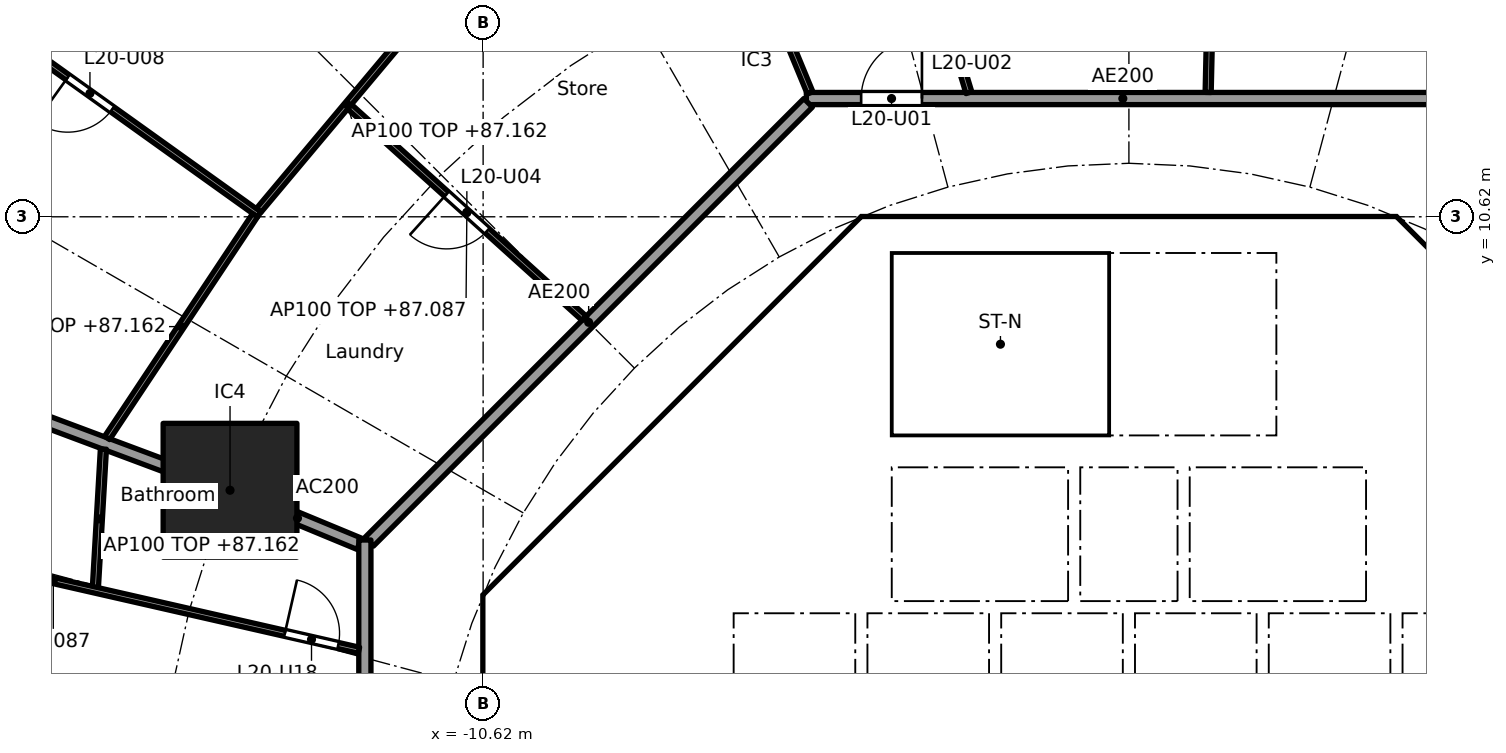
"""IFC4 building model, lengths in metres.
Left out: names, types, materials, properties, quantities, classifications, styles, units other than length and angle.
Written with IfcOpenShell. Run it as: python <this file> out.ifc"""

import sys

from ifc_helpers import new_model, si_unit, direction, frame, frame_2d, origin, origin_2d, place, context, subcontext, project, spatial, polyline, rectangle, outline, extrude, element, fill, save


model = new_model("IFC4")
c1 = context("Model", 3, precision=1e-05, world=origin(), true_north=direction((0.0, 1.0)))
c2 = subcontext(c1, "Body", "Model", "MODEL_VIEW")
j1 = project(units=[si_unit("LENGTHUNIT", "METRE"), si_unit("PLANEANGLEUNIT", "RADIAN")], contexts=[c1])
p1 = place(None, origin())
s1 = spatial("IfcSite", under=j1, at=p1, CompositionType="ELEMENT")
p2 = place(p1, origin())
s2 = spatial("IfcBuilding", under=s1, at=p2, CompositionType="ELEMENT")
p3 = place(p2, frame((0.0, 0.0, 84.4)))
s3 = spatial("IfcBuildingStorey", under=s2, at=p3, CompositionType="ELEMENT", Elevation=84.4)
p4 = place(p3, frame((-14.782, 6.123, 0.0), z_axis=(0.0, 0.0, 1.0), x_axis=(1.0, 0.0, 0.0)))
e1 = element("IfcColumn", 1, at=p4, inside=s3, PredefinedType="COLUMN", context=c2, shape_type="SweptSolid", body=[
    extrude(rectangle(XDim=2.2, YDim=2.2, at=origin_2d()), origin(), (0.0, 0.0, 1.0), 3.7),
])
p5 = place(p3, frame((9.988, 4.613, 0.0), z_axis=(0.0, 0.0, 1.0), x_axis=(-0.707106781187, 0.707106781187, 0.0)))
e2 = element("IfcWall", 2, at=p5, inside=s3, PredefinedType="SHEAR", context=c2, shape_type="SweptSolid", body=[
    extrude(rectangle(XDim=7.602, YDim=0.6, at=frame_2d((3.801, 0.0))), origin(), (0.0, 0.0, 1.0), 3.44),
])
p6 = place(p5, frame((3.201, 0.0, 0.0)))
e3 = element("IfcOpeningElement", 3, at=p6, cuts=e2, PredefinedType="OPENING", context=c2, shape_type="SweptSolid", body=[
    extrude(rectangle(XDim=1.2, YDim=2.1, at=frame_2d((0.6, 1.05))), frame((0.0, 0.31, 0.0), z_axis=(0.0, -1.0, 0.0), x_axis=(1.0, 0.0, 0.0)), (0.0, 0.0, 1.0), 0.62),
])
p7 = place(p3, frame((-4.613, 9.988, 0.0), z_axis=(0.0, 0.0, 1.0), x_axis=(-0.707106781187, -0.707106781187, 0.0)))
e4 = element("IfcWall", 4, at=p7, inside=s3, PredefinedType="SHEAR", context=c2, shape_type="SweptSolid", body=[
    extrude(rectangle(XDim=7.602, YDim=0.6, at=frame_2d((3.801, 0.0))), origin(), (0.0, 0.0, 1.0), 3.44),
])
p8 = place(p7, frame((0.351, 0.0, 0.0)))
e5 = element("IfcOpeningElement", 5, at=p8, cuts=e4, PredefinedType="OPENING", context=c2, shape_type="SweptSolid", body=[
    extrude(rectangle(XDim=1.1, YDim=2.1, at=frame_2d((0.55, 1.05))), frame((0.0, 0.31, 0.0), z_axis=(0.0, -1.0, 0.0), x_axis=(1.0, 0.0, 0.0)), (0.0, 0.0, 1.0), 0.62),
])
p9 = place(p3, frame((-10.325, 3.801, 0.0), z_axis=(0.0, 0.0, 1.0), x_axis=(0.0, -1.0, 0.0)))
e6 = element("IfcWall", 6, at=p9, inside=s3, PredefinedType="SHEAR", context=c2, shape_type="SweptSolid", body=[
    extrude(rectangle(XDim=7.602, YDim=0.6, at=frame_2d((3.801, 0.0))), origin(), (0.0, 0.0, 1.0), 3.44),
])
p10 = place(p9, frame((0.651, 0.0, 0.0)))
e7 = element("IfcOpeningElement", 7, at=p10, cuts=e6, PredefinedType="OPENING", context=c2, shape_type="SweptSolid", body=[
    extrude(rectangle(XDim=1.5, YDim=2.1, at=frame_2d((0.75, 1.05))), frame((0.0, 0.31, 0.0), z_axis=(0.0, -1.0, 0.0), x_axis=(1.0, 0.0, 0.0)), (0.0, 0.0, 1.0), 0.62),
])
p11 = place(p9, frame((5.451, 0.0, 0.0)))
e8 = element("IfcOpeningElement", 8, at=p11, cuts=e6, PredefinedType="OPENING", context=c2, shape_type="SweptSolid", body=[
    extrude(rectangle(XDim=1.5, YDim=2.1, at=frame_2d((0.75, 1.05))), frame((0.0, 0.31, 0.0), z_axis=(0.0, -1.0, 0.0), x_axis=(1.0, 0.0, 0.0)), (0.0, 0.0, 1.0), 0.62),
])
p12 = place(p3, frame((-5.8, 4.3, 0.0), z_axis=(0.0, 0.0, 1.0), x_axis=(0.0, 1.0, 0.0)))
e9 = element("IfcWall", 9, at=p12, inside=s3, PredefinedType="PARTITIONING", context=c2, shape_type="SweptSolid", body=[
    extrude(rectangle(XDim=3.927, YDim=0.15, at=frame_2d((1.963, 0.0))), origin(), (0.0, 0.0, 1.0), 3.44),
])
p13 = place(p12, frame((1.551, 0.0, 0.0)))
e10 = element("IfcOpeningElement", 10, at=p13, cuts=e9, PredefinedType="OPENING", context=c2, shape_type="SweptSolid", body=[
    extrude(rectangle(XDim=0.9, YDim=2.1, at=frame_2d((0.45, 1.05))), frame((0.0, 0.085, 0.0), z_axis=(0.0, -1.0, 0.0), x_axis=(1.0, 0.0, 0.0)), (0.0, 0.0, 1.0), 0.17),
])
p14 = place(p3, frame((4.0, 4.3, 0.0), z_axis=(0.0, 0.0, 1.0), x_axis=(0.0, 1.0, 0.0)))
e11 = element("IfcWall", 11, at=p14, inside=s3, PredefinedType="SOLIDWALL", context=c2, shape_type="SweptSolid", body=[
    extrude(rectangle(XDim=2.2, YDim=0.2, at=frame_2d((1.1, 0.0))), origin(), (0.0, 0.0, 1.0), 3.44),
])
p15 = place(p14, frame((0.55, 0.0, 0.0)))
e12 = element("IfcOpeningElement", 12, at=p15, cuts=e11, PredefinedType="OPENING", context=c2, shape_type="SweptSolid", body=[
    extrude(rectangle(XDim=1.1, YDim=2.1, at=frame_2d((0.55, 1.05))), frame((0.0, 0.11, 0.0), z_axis=(0.0, -1.0, 0.0), x_axis=(1.0, 0.0, 0.0)), (0.0, 0.0, 1.0), 0.22),
])
p16 = place(p3, frame((-4.0, 4.3, 0.0), z_axis=(0.0, 0.0, 1.0), x_axis=(0.0, 1.0, 0.0)))
e13 = element("IfcWall", 13, at=p16, inside=s3, PredefinedType="SOLIDWALL", context=c2, shape_type="SweptSolid", body=[
    extrude(rectangle(XDim=2.2, YDim=0.2, at=frame_2d((1.1, 0.0))), origin(), (0.0, 0.0, 1.0), 3.44),
])
p17 = place(p16, frame((0.55, 0.0, 0.0)))
e14 = element("IfcOpeningElement", 14, at=p17, cuts=e13, PredefinedType="OPENING", context=c2, shape_type="SweptSolid", body=[
    extrude(rectangle(XDim=1.1, YDim=2.1, at=frame_2d((0.55, 1.05))), frame((0.0, 0.11, 0.0), z_axis=(0.0, -1.0, 0.0), x_axis=(1.0, 0.0, 0.0)), (0.0, 0.0, 1.0), 0.22),
])
p18 = place(p3, frame((4.0, 7.025, 0.0), z_axis=(0.0, 0.0, 1.0), x_axis=(0.0, 1.0, 0.0)))
e15 = element("IfcWall", 15, at=p18, inside=s3, PredefinedType="SOLIDWALL", context=c2, shape_type="SweptSolid", body=[
    extrude(rectangle(XDim=3.0, YDim=0.2, at=frame_2d((1.5, 0.0))), origin(), (0.0, 0.0, 1.0), 3.44),
])
p19 = place(p18, frame((0.925, 0.0, 0.0)))
e16 = element("IfcOpeningElement", 16, at=p19, cuts=e15, PredefinedType="OPENING", context=c2, shape_type="SweptSolid", body=[
    extrude(rectangle(XDim=1.1, YDim=2.1, at=frame_2d((0.55, 1.05))), frame((0.0, 0.11, 0.0), z_axis=(0.0, -1.0, 0.0), x_axis=(1.0, 0.0, 0.0)), (0.0, 0.0, 1.0), 0.22),
])
p20 = place(p3, origin())
e17 = element("IfcWall", 17, at=p20, inside=s3, PredefinedType="SHEAR", context=c2, shape_type="SweptSolid", body=[
    extrude(outline(polyline([(-10.2, 4.825), (-9.776, 4.401), (-10.025, 4.152), (-10.025, 3.801), (-10.625, 3.801), (-10.625, 4.401), (-10.2, 4.825)])), origin(), (0.0, 0.0, 1.0), 3.44),
])
p21 = place(p3, origin())
e18 = element("IfcWall", 18, at=p21, inside=s3, PredefinedType="SHEAR", context=c2, shape_type="SweptSolid", body=[
    extrude(outline(polyline([(-4.152, 10.025), (-4.401, 9.776), (-4.825, 10.2), (-4.401, 10.625), (4.401, 10.625), (4.825, 10.2), (4.401, 9.776), (4.152, 10.025), (-4.152, 10.025)])), origin(), (0.0, 0.0, 1.0), 3.44),
])
for number, where, z_axis, x_axis in (
    (19, (-0.9, 4.3, 0.0), (0.0, 0.0, 1.0), (0.0, 1.0, 0.0)),
    (20, (0.9, 4.3, 0.0), (0.0, 0.0, 1.0), (0.0, 1.0, 0.0)),
):
    element("IfcWall", number, at=place(p3, frame(where, z_axis=z_axis, x_axis=x_axis)), inside=s3, PredefinedType="SOLIDWALL", context=c2, shape_type="SweptSolid", body=[
        extrude(rectangle(XDim=2.2, YDim=0.2, at=frame_2d((1.1, 0.0))), origin(), (0.0, 0.0, 1.0), 3.44),
    ])
p22 = place(p3, origin())
e21 = element("IfcWall", 21, at=p22, inside=s3, PredefinedType="SOLIDWALL", context=c2, shape_type="SweptSolid", body=[
    extrude(outline(polyline([(-6.5, 2.1), (-6.7, 2.1), (-6.7, 4.3), (6.7, 4.3), (6.7, 2.1), (6.5, 2.1), (6.5, 4.1), (4.5, 4.1), (4.5, 2.1), (4.3, 2.1), (4.3, 4.1), (2.3, 4.1), (2.3, 2.1), (2.1, 2.1), (2.1, 4.1), (0.1, 4.1), (0.1, 2.1), (-0.1, 2.1), (-0.1, 4.1), (-2.1, 4.1), (-2.1, 2.1), (-2.3, 2.1), (-2.3, 4.1), (-4.3, 4.1), (-4.3, 2.1), (-4.5, 2.1), (-4.5, 4.1), (-6.5, 4.1), (-6.5, 2.1)])), origin(), (0.0, 0.0, 1.0), 3.44),
])
p23 = place(p3, frame((-10.025, 4.0, 0.0), z_axis=(0.0, 0.0, 1.0), x_axis=(1.0, 0.0, 0.0)))
e22 = element("IfcWall", 22, at=p23, inside=s3, PredefinedType="PARTITIONING", context=c2, shape_type="SweptSolid", body=[
    extrude(rectangle(XDim=3.325, YDim=0.2, at=frame_2d((1.662, 0.0))), origin(), (0.0, 0.0, 1.0), 3.44),
])
p24 = place(p3, origin())
e23 = element("IfcWall", 23, at=p24, inside=s3, PredefinedType="SOLIDWALL", context=c2, shape_type="SweptSolid", body=[
    extrude(outline(polyline([(-3.9, 7.025), (-4.1, 7.025), (-4.1, 10.025), (-3.9, 10.025), (-3.9, 7.025)])), origin(), (0.0, 0.0, 1.0), 3.44),
])
p25 = place(p3, origin())
e24 = element("IfcWall", 24, at=p25, inside=s3, PredefinedType="SOLIDWALL", context=c2, shape_type="SweptSolid", body=[
    extrude(outline(polyline([(4.1, 6.5), (-4.1, 6.5), (-4.1, 7.025), (4.1, 7.025), (4.1, 6.5)])), origin(), (0.0, 0.0, 1.0), 3.44),
])
p26 = place(p3, frame((-12.657, 5.243, 0.0), z_axis=(0.0, 0.0, 1.0), x_axis=(-0.923843626288, 0.382770106157, 0.0)))
e25 = element("IfcWall", 25, at=p26, inside=s3, PredefinedType="PARTITIONING", context=c2, shape_type="SweptSolid", body=[
    extrude(rectangle(XDim=2.199, YDim=0.2, at=frame_2d((1.1, 0.0))), origin(), (0.0, 0.0, 1.0), 3.44),
])
p27 = place(p3, frame((-14.829, 6.14, 0.0), z_axis=(0.0, 0.0, 1.0), x_axis=(-0.936597324342, 0.35040755134, 0.0)))
e26 = element("IfcWall", 26, at=p27, inside=s3, PredefinedType="PARTITIONING", context=c2, shape_type="SweptSolid", body=[
    extrude(rectangle(XDim=13.606, YDim=0.2, at=frame_2d((6.803, 0.0))), origin(), (0.0, 0.0, 1.0), 2.762),
])
p28 = place(p3, frame((5.104, 12.565, 0.0), z_axis=(0.0, 0.0, 1.0), x_axis=(-1.0, 0.0, 0.0)))
e27 = element("IfcWall", 27, at=p28, inside=s3, PredefinedType="PARTITIONING", context=c2, shape_type="SweptSolid", body=[
    extrude(rectangle(XDim=10.409, YDim=0.2, at=frame_2d((5.205, 0.0))), origin(), (0.0, 0.0, 1.0), 3.44),
])
p29 = place(p28, frame((8.508, 0.0, 0.0)))
e28 = element("IfcOpeningElement", 28, at=p29, cuts=e27, PredefinedType="OPENING", context=c2, shape_type="SweptSolid", body=[
    extrude(rectangle(XDim=1.0, YDim=2.1, at=frame_2d((0.5, 1.05))), frame((0.0, 0.11, 0.0), z_axis=(0.0, -1.0, 0.0), x_axis=(1.0, 0.0, 0.0)), (0.0, 0.0, 1.0), 0.22),
])
p30 = place(p3, frame((-5.275, 12.494, 0.0), z_axis=(0.0, 0.0, 1.0), x_axis=(-0.707106781187, -0.707106781187, 0.0)))
e29 = element("IfcWall", 29, at=p30, inside=s3, PredefinedType="PARTITIONING", context=c2, shape_type="SweptSolid", body=[
    extrude(rectangle(XDim=10.209, YDim=0.2, at=frame_2d((5.104, 0.0))), origin(), (0.0, 0.0, 1.0), 3.44),
])
p31 = place(p3, frame((-12.565, 5.304, 0.0), z_axis=(0.0, 0.0, 1.0), x_axis=(0.0, -1.0, 0.0)))
e30 = element("IfcWall", 30, at=p31, inside=s3, PredefinedType="PARTITIONING", context=c2, shape_type="SweptSolid", body=[
    extrude(rectangle(XDim=10.409, YDim=0.2, at=frame_2d((5.205, 0.0))), origin(), (0.0, 0.0, 1.0), 3.44),
])
p32 = place(p31, frame((3.07, 0.0, 0.0)))
e31 = element("IfcOpeningElement", 31, at=p32, cuts=e30, PredefinedType="OPENING", context=c2, shape_type="SweptSolid", body=[
    extrude(rectangle(XDim=1.0, YDim=2.1, at=frame_2d((0.5, 1.05))), frame((0.0, 0.11, 0.0), z_axis=(0.0, -1.0, 0.0), x_axis=(1.0, 0.0, 0.0)), (0.0, 0.0, 1.0), 0.22),
])
p33 = place(p3, frame((1.303, 12.665, 0.0), z_axis=(0.0, 0.0, 1.0), x_axis=(0.022412244057, 0.999748814111, 0.0)))
e32 = element("IfcWall", 32, at=p33, inside=s3, PredefinedType="PARTITIONING", context=c2, shape_type="SweptSolid", body=[
    extrude(rectangle(XDim=13.203, YDim=0.1, at=frame_2d((6.601, 0.0))), origin(), (0.0, 0.0, 1.0), 2.687),
])
p34 = place(p33, frame((2.407, 0.0, 0.0)))
e33 = element("IfcOpeningElement", 33, at=p34, cuts=e32, PredefinedType="OPENING", context=c2, shape_type="SweptSolid", body=[
    extrude(rectangle(XDim=0.9, YDim=2.1, at=frame_2d((0.45, 1.05))), frame((0.0, 0.06, 0.0), z_axis=(0.0, -1.0, 0.0), x_axis=(1.0, 0.0, 0.0)), (0.0, 0.0, 1.0), 0.12),
])
p35 = place(p33, frame((9.009, 0.0, 0.0)))
e34 = element("IfcOpeningElement", 34, at=p35, cuts=e32, PredefinedType="OPENING", context=c2, shape_type="SweptSolid", body=[
    extrude(rectangle(XDim=0.9, YDim=2.1, at=frame_2d((0.45, 1.05))), frame((0.0, 0.06, 0.0), z_axis=(0.0, -1.0, 0.0), x_axis=(1.0, 0.0, 0.0)), (0.0, 0.0, 1.0), 0.12),
])
p36 = place(p3, frame((-2.631, 12.66, 0.0), z_axis=(0.0, 0.0, 1.0), x_axis=(-0.290161396499, 0.956977723869, 0.0)))
e35 = element("IfcWall", 35, at=p36, inside=s3, PredefinedType="PARTITIONING", context=c2, shape_type="SweptSolid", body=[
    extrude(rectangle(XDim=13.552, YDim=0.1, at=frame_2d((6.776, 0.0))), origin(), (0.0, 0.0, 1.0), 2.687),
])
p37 = place(p36, frame((0.772, 0.0, 0.0)))
e36 = element("IfcOpeningElement", 36, at=p37, cuts=e35, PredefinedType="OPENING", context=c2, shape_type="SweptSolid", body=[
    extrude(rectangle(XDim=0.9, YDim=2.1, at=frame_2d((0.45, 1.05))), frame((0.0, 0.06, 0.0), z_axis=(0.0, -1.0, 0.0), x_axis=(1.0, 0.0, 0.0)), (0.0, 0.0, 1.0), 0.12),
])
p38 = place(p36, frame((9.212, 0.0, 0.0)))
e37 = element("IfcOpeningElement", 37, at=p38, cuts=e35, PredefinedType="OPENING", context=c2, shape_type="SweptSolid", body=[
    extrude(rectangle(XDim=0.9, YDim=2.1, at=frame_2d((0.45, 1.05))), frame((0.0, 0.06, 0.0), z_axis=(0.0, -1.0, 0.0), x_axis=(1.0, 0.0, 0.0)), (0.0, 0.0, 1.0), 0.12),
])
p39 = place(p3, frame((-5.243, 12.657, 0.0), z_axis=(0.0, 0.0, 1.0), x_axis=(-0.382703272338, 0.923871314276, 0.0)))
e38 = element("IfcWall", 38, at=p39, inside=s3, PredefinedType="PARTITIONING", context=c2, shape_type="SweptSolid", body=[
    extrude(rectangle(XDim=2.249, YDim=0.1, at=frame_2d((1.125, 0.0))), origin(), (0.0, 0.0, 1.0), 3.44),
])
p40 = place(p3, frame((-11.396, 14.202, 0.0), z_axis=(0.0, 0.0, 1.0), x_axis=(-0.642483859922, -0.766299216847, 0.0)))
e39 = element("IfcWall", 39, at=p40, inside=s3, PredefinedType="PARTITIONING", context=c2, shape_type="SweptSolid", body=[
    extrude(rectangle(XDim=4.537, YDim=0.1, at=frame_2d((2.269, 0.0))), origin(), (0.0, 0.0, 1.0), 2.762),
])
p41 = place(p3, frame((-8.959, 8.952, 0.0), z_axis=(0.0, 0.0, 1.0), x_axis=(-0.742686144764, 0.669639672045, 0.0)))
e40 = element("IfcWall", 40, at=p41, inside=s3, PredefinedType="PARTITIONING", context=c2, shape_type="SweptSolid", body=[
    extrude(rectangle(XDim=5.194, YDim=0.1, at=frame_2d((2.597, 0.0))), origin(), (0.0, 0.0, 1.0), 2.687),
])
p42 = place(p41, frame((2.147, 0.0, 0.0)))
e41 = element("IfcOpeningElement", 41, at=p42, cuts=e40, PredefinedType="OPENING", context=c2, shape_type="SweptSolid", body=[
    extrude(rectangle(XDim=0.9, YDim=2.1, at=frame_2d((0.45, 1.05))), frame((0.0, 0.06, 0.0), z_axis=(0.0, -1.0, 0.0), x_axis=(1.0, 0.0, 0.0)), (0.0, 0.0, 1.0), 0.12),
])
p43 = place(p3, frame((-14.302, 10.657, 0.0), z_axis=(0.0, 0.0, 1.0), x_axis=(-0.813183002698, 0.582008079087, 0.0)))
e42 = element("IfcWall", 42, at=p43, inside=s3, PredefinedType="PARTITIONING", context=c2, shape_type="SweptSolid", body=[
    extrude(rectangle(XDim=13.074, YDim=0.1, at=frame_2d((6.537, 0.0))), origin(), (0.0, 0.0, 1.0), 2.762),
])
p44 = place(p43, frame((2.973, 0.0, 0.0)))
e43 = element("IfcOpeningElement", 43, at=p44, cuts=e42, PredefinedType="OPENING", context=c2, shape_type="SweptSolid", body=[
    extrude(rectangle(XDim=0.9, YDim=2.1, at=frame_2d((0.45, 1.05))), frame((0.0, 0.06, 0.0), z_axis=(0.0, -1.0, 0.0), x_axis=(1.0, 0.0, 0.0)), (0.0, 0.0, 1.0), 0.12),
])
p45 = place(p43, frame((9.485, 0.0, 0.0)))
e44 = element("IfcOpeningElement", 44, at=p45, cuts=e42, PredefinedType="OPENING", context=c2, shape_type="SweptSolid", body=[
    extrude(rectangle(XDim=0.9, YDim=2.1, at=frame_2d((0.45, 1.05))), frame((0.0, 0.06, 0.0), z_axis=(0.0, -1.0, 0.0), x_axis=(1.0, 0.0, 0.0)), (0.0, 0.0, 1.0), 0.12),
])
p46 = place(p3, frame((-14.371, 10.645, 0.0), z_axis=(0.0, 0.0, 1.0), x_axis=(-0.553341009285, -0.832954817168, 0.0)))
e45 = element("IfcWall", 45, at=p46, inside=s3, PredefinedType="PARTITIONING", context=c2, shape_type="SweptSolid", body=[
    extrude(rectangle(XDim=4.396, YDim=0.1, at=frame_2d((2.198, 0.0))), origin(), (0.0, 0.0, 1.0), 2.762),
])
p47 = place(p3, frame((-16.865, 6.8, 0.0), z_axis=(0.0, 0.0, 1.0), x_axis=(-0.057751176984, -0.998331008011, 0.0)))
e46 = element("IfcWall", 46, at=p47, inside=s3, PredefinedType="PARTITIONING", context=c2, shape_type="SweptSolid", body=[
    extrude(rectangle(XDim=2.3, YDim=0.1, at=frame_2d((1.15, 0.0))), origin(), (0.0, 0.0, 1.0), 2.762),
])
p48 = place(p3, frame((-12.662, 3.492, 0.0), z_axis=(0.0, 0.0, 1.0), x_axis=(-0.974981662956, 0.22228530518, 0.0)))
e47 = element("IfcWall", 47, at=p48, inside=s3, PredefinedType="PARTITIONING", context=c2, shape_type="SweptSolid", body=[
    extrude(rectangle(XDim=10.31, YDim=0.1, at=frame_2d((5.155, 0.0))), origin(), (0.0, 0.0, 1.0), 2.687),
])
p49 = place(p48, frame((0.35, 0.0, 0.0)))
e48 = element("IfcOpeningElement", 48, at=p49, cuts=e47, PredefinedType="OPENING", context=c2, shape_type="SweptSolid", body=[
    extrude(rectangle(XDim=0.9, YDim=2.1, at=frame_2d((0.45, 1.05))), frame((0.0, 0.06, 0.0), z_axis=(0.0, -1.0, 0.0), x_axis=(1.0, 0.0, 0.0)), (0.0, 0.0, 1.0), 0.12),
])
p50 = place(p48, frame((6.931, 0.0, 0.0)))
e49 = element("IfcOpeningElement", 49, at=p50, cuts=e47, PredefinedType="OPENING", context=c2, shape_type="SweptSolid", body=[
    extrude(rectangle(XDim=0.9, YDim=2.1, at=frame_2d((0.45, 1.05))), frame((0.0, 0.06, 0.0), z_axis=(0.0, -1.0, 0.0), x_axis=(1.0, 0.0, 0.0)), (0.0, 0.0, 1.0), 0.12),
])
p51 = place(p15, origin())
e50 = element("IfcDoor", 50, at=p51, inside=s3, OperationType="DOUBLE_DOOR_SLIDING", PredefinedType="DOOR", context=c2, shape_type="SweptSolid", body=[
    extrude(rectangle(XDim=1.1, YDim=2.1, at=frame_2d((0.55, 1.05))), frame((0.0, 0.025, 0.0), z_axis=(0.0, -1.0, 0.0), x_axis=(1.0, 0.0, 0.0)), (0.0, 0.0, 1.0), 0.05),
])
fill(e12, e50)
p52 = place(p17, origin())
e51 = element("IfcDoor", 51, at=p52, inside=s3, OperationType="DOUBLE_DOOR_SLIDING", PredefinedType="DOOR", context=c2, shape_type="SweptSolid", body=[
    extrude(rectangle(XDim=1.1, YDim=2.1, at=frame_2d((0.55, 1.05))), frame((0.0, 0.025, 0.0), z_axis=(0.0, -1.0, 0.0), x_axis=(1.0, 0.0, 0.0)), (0.0, 0.0, 1.0), 0.05),
])
fill(e14, e51)
p53 = place(p19, origin())
e52 = element("IfcDoor", 52, at=p53, inside=s3, OperationType="SINGLE_SWING_RIGHT", PredefinedType="DOOR", context=c2, shape_type="SweptSolid", body=[
    extrude(rectangle(XDim=1.1, YDim=2.1, at=frame_2d((0.55, 1.05))), frame((0.0, 0.025, 0.0), z_axis=(0.0, -1.0, 0.0), x_axis=(1.0, 0.0, 0.0)), (0.0, 0.0, 1.0), 0.05),
])
fill(e16, e52)
p54 = place(p13, origin())
e53 = element("IfcDoor", 53, at=p54, inside=s3, OperationType="SINGLE_SWING_LEFT", PredefinedType="DOOR", context=c2, shape_type="SweptSolid", body=[
    extrude(rectangle(XDim=0.9, YDim=2.1, at=frame_2d((0.45, 1.05))), frame((0.0, 0.025, 0.0), z_axis=(0.0, -1.0, 0.0), x_axis=(1.0, 0.0, 0.0)), (0.0, 0.0, 1.0), 0.05),
])
fill(e10, e53)
p55 = place(p10, origin())
e54 = element("IfcDoor", 54, at=p55, inside=s3, OperationType="DOUBLE_DOOR_SINGLE_SWING", PredefinedType="DOOR", context=c2, shape_type="SweptSolid", body=[
    extrude(rectangle(XDim=1.5, YDim=2.1, at=frame_2d((0.75, 1.05))), frame((0.0, 0.025, 0.0), z_axis=(0.0, -1.0, 0.0), x_axis=(1.0, 0.0, 0.0)), (0.0, 0.0, 1.0), 0.05),
])
fill(e7, e54)
p56 = place(p8, origin())
e55 = element("IfcDoor", 55, at=p56, inside=s3, OperationType="SINGLE_SWING_LEFT", PredefinedType="DOOR", context=c2, shape_type="SweptSolid", body=[
    extrude(rectangle(XDim=1.1, YDim=2.1, at=frame_2d((0.55, 1.05))), frame((0.0, 0.025, 0.0), z_axis=(0.0, -1.0, 0.0), x_axis=(1.0, 0.0, 0.0)), (0.0, 0.0, 1.0), 0.05),
])
fill(e5, e55)
p57 = place(p29, frame((1.0, 0.0, 0.0), x_axis=(-1.0, 0.0, 0.0)))
e56 = element("IfcDoor", 56, at=p57, inside=s3, OperationType="SINGLE_SWING_RIGHT", PredefinedType="DOOR", context=c2, shape_type="SweptSolid", body=[
    extrude(rectangle(XDim=1.0, YDim=2.1, at=frame_2d((0.5, 1.05))), frame((0.0, 0.025, 0.0), z_axis=(0.0, -1.0, 0.0), x_axis=(1.0, 0.0, 0.0)), (0.0, 0.0, 1.0), 0.05),
])
fill(e28, e56)
p58 = place(p42, origin())
e57 = element("IfcDoor", 57, at=p58, inside=s3, OperationType="SINGLE_SWING_RIGHT", PredefinedType="DOOR", context=c2, shape_type="SweptSolid", body=[
    extrude(rectangle(XDim=0.9, YDim=2.1, at=frame_2d((0.45, 1.05))), frame((0.0, 0.025, 0.0), z_axis=(0.0, -1.0, 0.0), x_axis=(1.0, 0.0, 0.0)), (0.0, 0.0, 1.0), 0.05),
])
fill(e41, e57)
p59 = place(p44, origin())
e58 = element("IfcDoor", 58, at=p59, inside=s3, OperationType="SINGLE_SWING_RIGHT", PredefinedType="DOOR", context=c2, shape_type="SweptSolid", body=[
    extrude(rectangle(XDim=0.9, YDim=2.1, at=frame_2d((0.45, 1.05))), frame((0.0, 0.025, 0.0), z_axis=(0.0, -1.0, 0.0), x_axis=(1.0, 0.0, 0.0)), (0.0, 0.0, 1.0), 0.05),
])
fill(e43, e58)
p60 = place(p49, frame((0.9, 0.0, 0.0), x_axis=(-1.0, 0.0, 0.0)))
e59 = element("IfcDoor", 59, at=p60, inside=s3, OperationType="SINGLE_SWING_LEFT", PredefinedType="DOOR", context=c2, shape_type="SweptSolid", body=[
    extrude(rectangle(XDim=0.9, YDim=2.1, at=frame_2d((0.45, 1.05))), frame((0.0, 0.025, 0.0), z_axis=(0.0, -1.0, 0.0), x_axis=(1.0, 0.0, 0.0)), (0.0, 0.0, 1.0), 0.05),
])
fill(e48, e59)
save(model, sys.argv[1])
